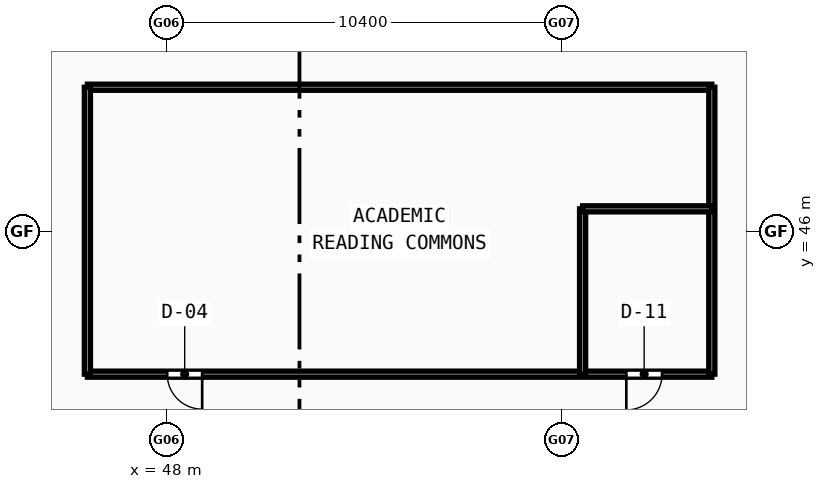
"""IFC4 building model, lengths in metres.
Left out: names, types, materials, properties, quantities, classifications, styles, units other than length and angle.
Written with IfcOpenShell. Run it as: python <this file> out.ifc"""

import sys

from ifc_helpers import new_model, si_unit, direction, frame, frame_2d, origin, place, context, subcontext, project, spatial, rectangle, extrude, source, transform, mapped, element, fill, save


model = new_model("IFC4")
c1 = context("Model", 3, precision=1e-05, world=origin(), true_north=direction((0.0, 1.0)))
c2 = subcontext(c1, "Body", "Model", "MODEL_VIEW")
j1 = project(units=[si_unit("LENGTHUNIT", "METRE"), si_unit("PLANEANGLEUNIT", "RADIAN")], contexts=[c1])
p1 = place(None, origin())
s1 = spatial("IfcSite", under=j1, at=p1, CompositionType="ELEMENT")
p2 = place(p1, origin())
s2 = spatial("IfcBuilding", under=s1, at=p2, CompositionType="ELEMENT")
p3 = place(p2, frame((0.0, 0.0, 88.78)))
s3 = spatial("IfcBuildingStorey", under=s2, at=p3, CompositionType="ELEMENT", Elevation=88.78)
p4 = place(p3, frame((45.92, 42.25, 0.0), z_axis=(0.0, 0.0, 1.0), x_axis=(1.0, 0.0, 0.0)))
e1 = element("IfcWall", 1, at=p4, inside=s3, PredefinedType="PARTITIONING", context=c2, shape_type="SweptSolid", body=[
    extrude(rectangle(XDim=16.43, YDim=0.16, at=frame_2d((8.215, 0.0))), origin(), (0.0, 0.0, 1.0), 2.84),
])
p5 = place(p4, frame((2.1, 0.0, 0.0)))
e2 = element("IfcOpeningElement", 2, at=p5, cuts=e1, PredefinedType="OPENING", context=c2, shape_type="SweptSolid", body=[
    extrude(rectangle(XDim=0.92, YDim=2.1, at=frame_2d((0.46, 1.05))), frame((0.0, 0.09, 0.0), z_axis=(0.0, -1.0, 0.0), x_axis=(1.0, 0.0, 0.0)), (0.0, 0.0, 1.0), 0.18),
])
p6 = place(p4, frame((14.18, 0.0, 0.0)))
e3 = element("IfcOpeningElement", 3, at=p6, cuts=e1, PredefinedType="OPENING", context=c2, shape_type="SweptSolid", body=[
    extrude(rectangle(XDim=0.94, YDim=2.1, at=frame_2d((0.47, 1.05))), frame((0.0, 0.09, 0.0), z_axis=(0.0, -1.0, 0.0), x_axis=(1.0, 0.0, 0.0)), (0.0, 0.0, 1.0), 0.18),
])
p7 = place(p3, frame((45.92, 49.8, 0.0), z_axis=(0.0, 0.0, 1.0), x_axis=(1.0, 0.0, 0.0)))
e4 = element("IfcWall", 4, at=p7, inside=s3, PredefinedType="PARTITIONING", context=c2, shape_type="SweptSolid", body=[
    extrude(rectangle(XDim=16.43, YDim=0.16, at=frame_2d((8.215, 0.0))), origin(), (0.0, 0.0, 1.0), 2.84),
])
p8 = place(p3, frame((45.92, 42.25, 0.0), z_axis=(0.0, 0.0, 1.0), x_axis=(0.0, 1.0, 0.0)))
e5 = element("IfcWall", 5, at=p8, inside=s3, PredefinedType="PARTITIONING", context=c2, shape_type="SweptSolid", body=[
    extrude(rectangle(XDim=7.55, YDim=0.16, at=frame_2d((3.775, 0.0))), origin(), (0.0, 0.0, 1.0), 3.54),
])
p9 = place(p3, frame((62.35, 42.25, 0.0), z_axis=(0.0, 0.0, 1.0), x_axis=(0.0, 1.0, 0.0)))
e6 = element("IfcWall", 6, at=p9, inside=s3, PredefinedType="PARTITIONING", context=c2, shape_type="SweptSolid", body=[
    extrude(rectangle(XDim=7.55, YDim=0.16, at=frame_2d((3.775, 0.0))), origin(), (0.0, 0.0, 1.0), 2.84),
])
p10 = place(p3, frame((58.95, 42.25, 0.0), z_axis=(0.0, 0.0, 1.0), x_axis=(0.0, 1.0, 0.0)))
e7 = element("IfcWall", 7, at=p10, inside=s3, PredefinedType="PARTITIONING", context=c2, shape_type="SweptSolid", body=[
    extrude(rectangle(XDim=4.35, YDim=0.16, at=frame_2d((2.175, 0.0))), origin(), (0.0, 0.0, 1.0), 2.84),
])
p11 = place(p3, frame((58.95, 46.6, 0.0), z_axis=(0.0, 0.0, 1.0), x_axis=(1.0, 0.0, 0.0)))
e8 = element("IfcWall", 8, at=p11, inside=s3, PredefinedType="PARTITIONING", context=c2, shape_type="SweptSolid", body=[
    extrude(rectangle(XDim=3.4, YDim=0.16, at=frame_2d((1.7, 0.0))), origin(), (0.0, 0.0, 1.0), 2.84),
])
m1 = source(origin(), c2, "Body", "SweptSolid", [
    extrude(rectangle(XDim=0.92, YDim=2.1, at=frame_2d((0.46, 1.05))), frame((0.0, 0.025, 0.0), z_axis=(0.0, -1.0, 0.0), x_axis=(1.0, 0.0, 0.0)), (0.0, 0.0, 1.0), 0.05),
])
p12 = place(p5, frame((0.92, 0.0, 0.0), z_axis=(0.0, 0.0, 1.0), x_axis=(-1.0, 0.0, 0.0)))
e9 = element("IfcDoor", 9, at=p12, inside=s3, OperationType="SINGLE_SWING_LEFT", PredefinedType="DOOR", context=c2, shape_type="MappedRepresentation", body=[
    mapped(m1, transform((0.0, 0.0, 0.0), scale=1.0)),
])
fill(e2, e9)
m2 = source(origin(), c2, "Body", "SweptSolid", [
    extrude(rectangle(XDim=0.94, YDim=2.1, at=frame_2d((0.47, 1.05))), frame((0.0, 0.025, 0.0), z_axis=(0.0, -1.0, 0.0), x_axis=(1.0, 0.0, 0.0)), (0.0, 0.0, 1.0), 0.05),
])
p13 = place(p6, frame((0.94, 0.0, 0.0), z_axis=(0.0, 0.0, 1.0), x_axis=(-1.0, 0.0, 0.0)))
e10 = element("IfcDoor", 10, at=p13, inside=s3, OperationType="SINGLE_SWING_RIGHT", PredefinedType="DOOR", context=c2, shape_type="MappedRepresentation", body=[
    mapped(m2, transform((0.0, 0.0, 0.0), scale=1.0)),
])
fill(e3, e10)
save(model, sys.argv[1])
